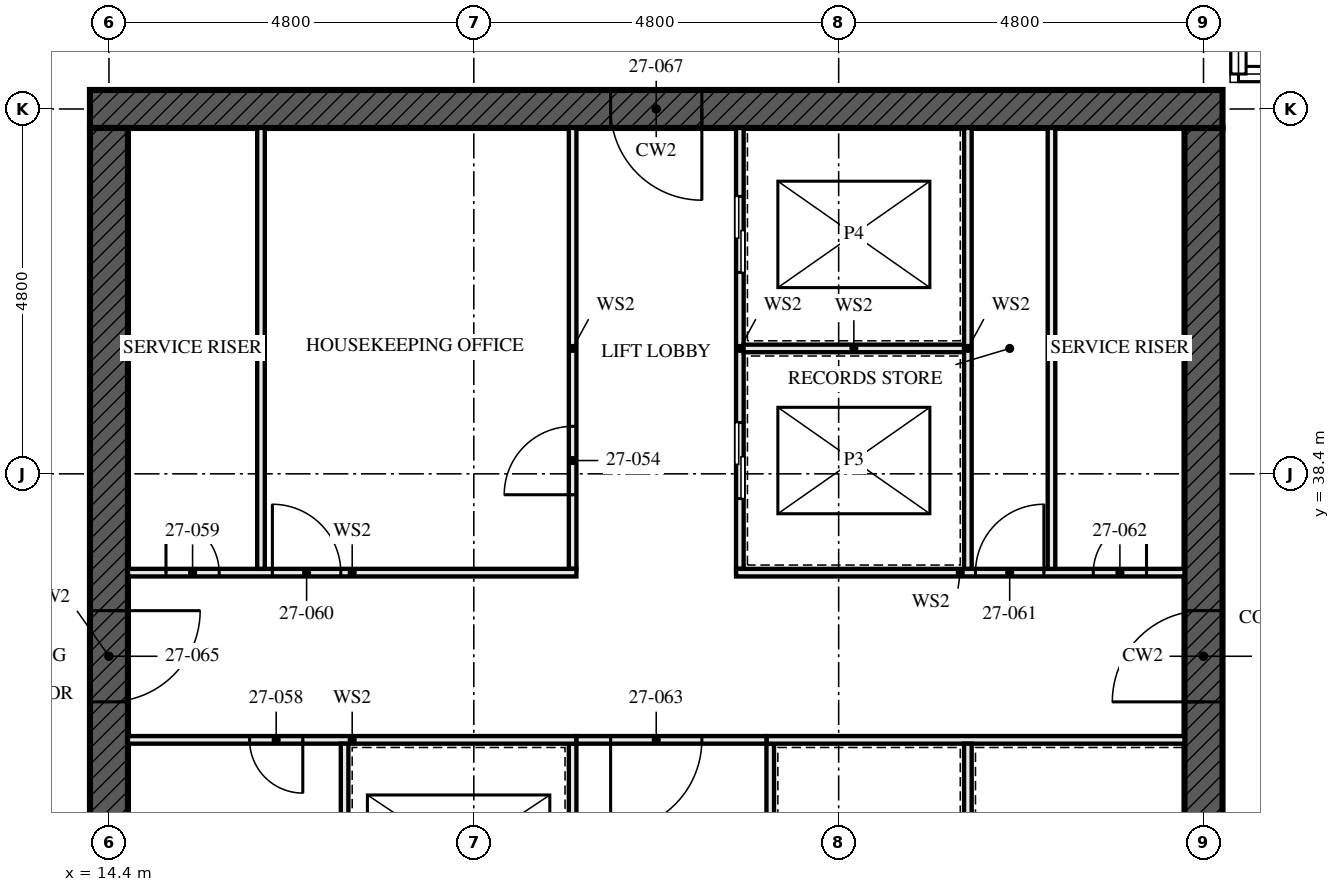
"""IFC4 building model, lengths in metres.
Left out: names, types, materials, properties, quantities, classifications, styles, units other than length and angle.
Written with IfcOpenShell. Run it as: python <this file> out.ifc"""

import sys

from ifc_helpers import new_model, si_unit, direction, frame, frame_2d, origin, place, context, subcontext, project, spatial, rectangle, extrude, element, fill, save


model = new_model("IFC4")
c1 = context("Model", 3, precision=1e-05, world=origin(), true_north=direction((0.0, 1.0)))
c2 = subcontext(c1, "Body", "Model", "MODEL_VIEW")
j1 = project(units=[si_unit("LENGTHUNIT", "METRE"), si_unit("PLANEANGLEUNIT", "RADIAN")], contexts=[c1])
p1 = place(None, origin())
s1 = spatial("IfcSite", under=j1, at=p1, CompositionType="ELEMENT")
p2 = place(p1, origin())
s2 = spatial("IfcBuilding", under=s1, at=p2, CompositionType="ELEMENT")
p3 = place(p2, frame((0.0, 0.0, 101.5)))
s3 = spatial("IfcBuildingStorey", under=s2, at=p3, CompositionType="ELEMENT", Elevation=101.5)
p4 = place(p3, frame((29.05, 43.2, -0.17), z_axis=(0.0, 0.0, 1.0), x_axis=(-1.0, 0.0, 0.0)))
e1 = element("IfcWall", 1, at=p4, inside=s3, PredefinedType="SHEAR", context=c2, shape_type="SweptSolid", body=[
    extrude(rectangle(XDim=14.9, YDim=0.5, at=frame_2d((7.45, 0.0))), origin(), (0.0, 0.0, 1.0), 3.5),
])
p5 = place(p4, frame((6.85, 0.0, 0.17)))
e2 = element("IfcOpeningElement", 2, at=p5, cuts=e1, PredefinedType="OPENING", context=c2, shape_type="SweptSolid", body=[
    extrude(rectangle(XDim=1.2, YDim=2.1, at=frame_2d((0.6, 1.05))), frame((0.0, 0.26, 0.0), z_axis=(0.0, -1.0, 0.0), x_axis=(1.0, 0.0, 0.0)), (0.0, 0.0, 1.0), 0.521),
])
p6 = place(p3, frame((14.4, 42.95, -0.17), z_axis=(0.0, 0.0, 1.0), x_axis=(0.0, -1.0, 0.0)))
e3 = element("IfcWall", 3, at=p6, inside=s3, PredefinedType="SHEAR", context=c2, shape_type="SweptSolid", body=[
    extrude(rectangle(XDim=13.9, YDim=0.5, at=frame_2d((6.95, 0.0))), origin(), (0.0, 0.0, 1.0), 3.5),
])
p7 = place(p6, frame((6.35, 0.0, 0.17)))
e4 = element("IfcOpeningElement", 4, at=p7, cuts=e3, PredefinedType="OPENING", context=c2, shape_type="SweptSolid", body=[
    extrude(rectangle(XDim=1.2, YDim=2.1, at=frame_2d((0.6, 1.05))), frame((0.0, 0.26, 0.0), z_axis=(0.0, -1.0, 0.0), x_axis=(1.0, 0.0, 0.0)), (0.0, 0.0, 1.0), 0.521),
])
p8 = place(p3, frame((28.8, 29.05, -0.17), z_axis=(0.0, 0.0, 1.0), x_axis=(0.0, 1.0, 0.0)))
e5 = element("IfcWall", 5, at=p8, inside=s3, PredefinedType="SHEAR", context=c2, shape_type="SweptSolid", body=[
    extrude(rectangle(XDim=13.9, YDim=0.5, at=frame_2d((6.95, 0.0))), origin(), (0.0, 0.0, 1.0), 3.5),
])
p9 = place(p8, frame((6.35, 0.0, 0.17)))
e6 = element("IfcOpeningElement", 6, at=p9, cuts=e5, PredefinedType="OPENING", context=c2, shape_type="SweptSolid", body=[
    extrude(rectangle(XDim=1.2, YDim=2.1, at=frame_2d((0.6, 1.05))), frame((0.0, 0.26, 0.0), z_axis=(0.0, -1.0, 0.0), x_axis=(1.0, 0.0, 0.0)), (0.0, 0.0, 1.0), 0.521),
])
for number, where, z_axis, x_axis in (
    (7, (16.4, 37.15, 0.0), (0.0, 0.0, 1.0), (0.0, 1.0, 0.0)),
    (8, (26.8, 37.15, 0.0), (0.0, 0.0, 1.0), (0.0, 1.0, 0.0)),
):
    element("IfcWall", number, at=place(p3, frame(where, z_axis=z_axis, x_axis=x_axis)), inside=s3, PredefinedType="SOLIDWALL", context=c2, shape_type="SweptSolid", body=[
        extrude(rectangle(XDim=5.8, YDim=0.1, at=frame_2d((2.9, 0.0))), origin(), (0.0, 0.0, 1.0), 3.33),
    ])
p10 = place(p3, frame((20.5, 29.05, 0.0), z_axis=(0.0, 0.0, 1.0), x_axis=(0.0, 1.0, 0.0)))
e9 = element("IfcWall", 9, at=p10, inside=s3, PredefinedType="SOLIDWALL", context=c2, shape_type="SweptSolid", body=[
    extrude(rectangle(XDim=5.8, YDim=0.1, at=frame_2d((2.9, 0.0))), origin(), (0.0, 0.0, 1.0), 3.33),
])
p11 = place(p10, frame((0.8, 0.0, 0.0)))
e10 = element("IfcOpeningElement", 10, at=p11, cuts=e9, PredefinedType="OPENING", context=c2, shape_type="SweptSolid", body=[
    extrude(rectangle(XDim=1.1, YDim=2.3, at=frame_2d((0.55, 1.15))), frame((0.0, 0.061, 0.0), z_axis=(0.0, -1.0, 0.0), x_axis=(1.0, 0.0, 0.0)), (0.0, 0.0, 1.0), 0.121),
])
p12 = place(p10, frame((3.775, 0.0, 0.0)))
e11 = element("IfcOpeningElement", 11, at=p12, cuts=e9, PredefinedType="OPENING", context=c2, shape_type="SweptSolid", body=[
    extrude(rectangle(XDim=1.1, YDim=2.3, at=frame_2d((0.55, 1.15))), frame((0.0, 0.061, 0.0), z_axis=(0.0, -1.0, 0.0), x_axis=(1.0, 0.0, 0.0)), (0.0, 0.0, 1.0), 0.121),
])
p13 = place(p3, frame((20.5, 37.15, 0.0), z_axis=(0.0, 0.0, 1.0), x_axis=(0.0, 1.0, 0.0)))
e12 = element("IfcWall", 12, at=p13, inside=s3, PredefinedType="SOLIDWALL", context=c2, shape_type="SweptSolid", body=[
    extrude(rectangle(XDim=5.8, YDim=0.1, at=frame_2d((2.9, 0.0))), origin(), (0.0, 0.0, 1.0), 3.33),
])
p14 = place(p13, frame((0.975, 0.0, 0.0)))
e13 = element("IfcOpeningElement", 13, at=p14, cuts=e12, PredefinedType="OPENING", context=c2, shape_type="SweptSolid", body=[
    extrude(rectangle(XDim=0.9, YDim=2.1, at=frame_2d((0.45, 1.05))), frame((0.0, 0.061, 0.0), z_axis=(0.0, -1.0, 0.0), x_axis=(1.0, 0.0, 0.0)), (0.0, 0.0, 1.0), 0.121),
])
p15 = place(p3, frame((22.7, 37.15, 0.0), z_axis=(0.0, 0.0, 1.0), x_axis=(0.0, 1.0, 0.0)))
e14 = element("IfcWall", 14, at=p15, inside=s3, PredefinedType="SOLIDWALL", context=c2, shape_type="SweptSolid", body=[
    extrude(rectangle(XDim=5.8, YDim=0.1, at=frame_2d((2.9, 0.0))), origin(), (0.0, 0.0, 1.0), 3.33),
])
p16 = place(p15, frame((0.925, 0.0, 0.0)))
e15 = element("IfcOpeningElement", 15, at=p16, cuts=e14, PredefinedType="OPENING", context=c2, shape_type="SweptSolid", body=[
    extrude(rectangle(XDim=1.0, YDim=2.1, at=frame_2d((0.5, 1.05))), frame((0.0, 0.061, 0.0), z_axis=(0.0, -1.0, 0.0), x_axis=(1.0, 0.0, 0.0)), (0.0, 0.0, 1.0), 0.121),
])
p17 = place(p15, frame((3.9, 0.0, 0.0)))
e16 = element("IfcOpeningElement", 16, at=p17, cuts=e14, PredefinedType="OPENING", context=c2, shape_type="SweptSolid", body=[
    extrude(rectangle(XDim=1.0, YDim=2.1, at=frame_2d((0.5, 1.05))), frame((0.0, 0.061, 0.0), z_axis=(0.0, -1.0, 0.0), x_axis=(1.0, 0.0, 0.0)), (0.0, 0.0, 1.0), 0.121),
])
p18 = place(p3, frame((23.1, 29.05, 0.0), z_axis=(0.0, 0.0, 1.0), x_axis=(0.0, 1.0, 0.0)))
e17 = element("IfcWall", 17, at=p18, inside=s3, PredefinedType="SOLIDWALL", context=c2, shape_type="SweptSolid", body=[
    extrude(rectangle(XDim=5.8, YDim=0.1, at=frame_2d((2.9, 0.0))), origin(), (0.0, 0.0, 1.0), 3.33),
])
p19 = place(p18, frame((1.0, 0.0, 0.0)))
e18 = element("IfcOpeningElement", 18, at=p19, cuts=e17, PredefinedType="OPENING", context=c2, shape_type="SweptSolid", body=[
    extrude(rectangle(XDim=0.7, YDim=2.1, at=frame_2d((0.35, 1.05))), frame((0.0, 0.061, 0.0), z_axis=(0.0, -1.0, 0.0), x_axis=(1.0, 0.0, 0.0)), (0.0, 0.0, 1.0), 0.121),
])
p20 = place(p3, frame((14.65, 34.9, 0.0), z_axis=(0.0, 0.0, 1.0), x_axis=(1.0, 0.0, 0.0)))
e19 = element("IfcWall", 19, at=p20, inside=s3, PredefinedType="SOLIDWALL", context=c2, shape_type="SweptSolid", body=[
    extrude(rectangle(XDim=5.9, YDim=0.1, at=frame_2d((2.95, 0.0))), origin(), (0.0, 0.0, 1.0), 3.33),
])
p21 = place(p20, frame((1.6, 0.0, 0.0)))
e20 = element("IfcOpeningElement", 20, at=p21, cuts=e19, PredefinedType="OPENING", context=c2, shape_type="SweptSolid", body=[
    extrude(rectangle(XDim=0.7, YDim=2.1, at=frame_2d((0.35, 1.05))), frame((0.0, 0.061, 0.0), z_axis=(0.0, -1.0, 0.0), x_axis=(1.0, 0.0, 0.0)), (0.0, 0.0, 1.0), 0.121),
])
p22 = place(p3, frame((23.05, 34.9, 0.0), z_axis=(0.0, 0.0, 1.0), x_axis=(1.0, 0.0, 0.0)))
e21 = element("IfcWall", 21, at=p22, inside=s3, PredefinedType="SOLIDWALL", context=c2, shape_type="SweptSolid", body=[
    extrude(rectangle(XDim=5.5, YDim=0.1, at=frame_2d((2.75, 0.0))), origin(), (0.0, 0.0, 1.0), 3.33),
])
p23 = place(p3, frame((14.65, 37.1, 0.0), z_axis=(0.0, 0.0, 1.0), x_axis=(1.0, 0.0, 0.0)))
e22 = element("IfcWall", 22, at=p23, inside=s3, PredefinedType="SOLIDWALL", context=c2, shape_type="SweptSolid", body=[
    extrude(rectangle(XDim=5.9, YDim=0.1, at=frame_2d((2.95, 0.0))), origin(), (0.0, 0.0, 1.0), 3.33),
])
p24 = place(p23, frame((0.5, 0.0, 0.0)))
e23 = element("IfcOpeningElement", 23, at=p24, cuts=e22, PredefinedType="OPENING", context=c2, shape_type="SweptSolid", body=[
    extrude(rectangle(XDim=0.7, YDim=2.1, at=frame_2d((0.35, 1.05))), frame((0.0, 0.061, 0.0), z_axis=(0.0, -1.0, 0.0), x_axis=(1.0, 0.0, 0.0)), (0.0, 0.0, 1.0), 0.121),
])
p25 = place(p23, frame((1.9, 0.0, 0.0)))
e24 = element("IfcOpeningElement", 24, at=p25, cuts=e22, PredefinedType="OPENING", context=c2, shape_type="SweptSolid", body=[
    extrude(rectangle(XDim=0.9, YDim=2.1, at=frame_2d((0.45, 1.05))), frame((0.0, 0.061, 0.0), z_axis=(0.0, -1.0, 0.0), x_axis=(1.0, 0.0, 0.0)), (0.0, 0.0, 1.0), 0.121),
])
p26 = place(p3, frame((22.65, 37.1, 0.0), z_axis=(0.0, 0.0, 1.0), x_axis=(1.0, 0.0, 0.0)))
e25 = element("IfcWall", 25, at=p26, inside=s3, PredefinedType="SOLIDWALL", context=c2, shape_type="SweptSolid", body=[
    extrude(rectangle(XDim=5.9, YDim=0.1, at=frame_2d((2.95, 0.0))), origin(), (0.0, 0.0, 1.0), 3.33),
])
p27 = place(p26, frame((3.15, 0.0, 0.0)))
e26 = element("IfcOpeningElement", 26, at=p27, cuts=e25, PredefinedType="OPENING", context=c2, shape_type="SweptSolid", body=[
    extrude(rectangle(XDim=0.9, YDim=2.1, at=frame_2d((0.45, 1.05))), frame((0.0, 0.061, 0.0), z_axis=(0.0, -1.0, 0.0), x_axis=(1.0, 0.0, 0.0)), (0.0, 0.0, 1.0), 0.121),
])
p28 = place(p26, frame((4.7, 0.0, 0.0)))
e27 = element("IfcOpeningElement", 27, at=p28, cuts=e25, PredefinedType="OPENING", context=c2, shape_type="SweptSolid", body=[
    extrude(rectangle(XDim=0.7, YDim=2.1, at=frame_2d((0.35, 1.05))), frame((0.0, 0.061, 0.0), z_axis=(0.0, -1.0, 0.0), x_axis=(1.0, 0.0, 0.0)), (0.0, 0.0, 1.0), 0.121),
])
p29 = place(p3, frame((20.55, 34.9, 0.0), z_axis=(0.0, 0.0, 1.0), x_axis=(1.0, 0.0, 0.0)))
e28 = element("IfcWall", 28, at=p29, inside=s3, PredefinedType="SOLIDWALL", context=c2, shape_type="SweptSolid", body=[
    extrude(rectangle(XDim=2.5, YDim=0.1, at=frame_2d((1.25, 0.0))), origin(), (0.0, 0.0, 1.0), 3.33),
])
p30 = place(p29, frame((0.45, 0.0, 0.0)))
e29 = element("IfcOpeningElement", 29, at=p30, cuts=e28, PredefinedType="OPENING", context=c2, shape_type="SweptSolid", body=[
    extrude(rectangle(XDim=1.2, YDim=2.1, at=frame_2d((0.6, 1.05))), frame((0.0, 0.061, 0.0), z_axis=(0.0, -1.0, 0.0), x_axis=(1.0, 0.0, 0.0)), (0.0, 0.0, 1.0), 0.121),
])
p31 = place(p3, frame((17.5, 29.05, 0.0), z_axis=(0.0, 0.0, 1.0), x_axis=(0.0, 1.0, 0.0)))
e30 = element("IfcWall", 30, at=p31, inside=s3, PredefinedType="SOLIDWALL", context=c2, shape_type="SweptSolid", body=[
    extrude(rectangle(XDim=5.8, YDim=0.1, at=frame_2d((2.9, 0.0))), origin(), (0.0, 0.0, 1.0), 3.33),
])
p32 = place(p3, frame((22.75, 40.05, 0.0), z_axis=(0.0, 0.0, 1.0), x_axis=(1.0, 0.0, 0.0)))
e31 = element("IfcWall", 31, at=p32, inside=s3, PredefinedType="SOLIDWALL", context=c2, shape_type="SweptSolid", body=[
    extrude(rectangle(XDim=2.9, YDim=0.1, at=frame_2d((1.45, 0.0))), origin(), (0.0, 0.0, 1.0), 3.33),
])
p33 = place(p3, frame((25.7, 37.15, 0.0), z_axis=(0.0, 0.0, 1.0), x_axis=(0.0, 1.0, 0.0)))
e32 = element("IfcWall", 32, at=p33, inside=s3, PredefinedType="SOLIDWALL", context=c2, shape_type="SweptSolid", body=[
    extrude(rectangle(XDim=5.8, YDim=0.1, at=frame_2d((2.9, 0.0))), origin(), (0.0, 0.0, 1.0), 3.33),
])
p34 = place(p3, frame((25.7, 31.95, 0.0), z_axis=(0.0, 0.0, 1.0), x_axis=(0.0, 1.0, 0.0)))
e33 = element("IfcWall", 33, at=p34, inside=s3, PredefinedType="SOLIDWALL", context=c2, shape_type="SweptSolid", body=[
    extrude(rectangle(XDim=2.9, YDim=0.1, at=frame_2d((1.45, 0.0))), origin(), (0.0, 0.0, 1.0), 3.33),
])
p35 = place(p14, origin())
e34 = element("IfcDoor", 34, at=p35, inside=s3, OperationType="SINGLE_SWING_RIGHT", PredefinedType="DOOR", context=c2, shape_type="SweptSolid", body=[
    extrude(rectangle(XDim=0.9, YDim=2.1, at=frame_2d((0.45, 1.05))), frame((0.0, 0.027, 0.0), z_axis=(0.0, -1.0, 0.0), x_axis=(1.0, 0.0, 0.0)), (0.0, 0.0, 1.0), 0.054),
])
fill(e13, e34)
p36 = place(p16, origin())
e35 = element("IfcDoor", 35, at=p36, inside=s3, OperationType="SLIDING_TO_LEFT", PredefinedType="DOOR", context=c2, shape_type="SweptSolid", body=[
    extrude(rectangle(XDim=1.0, YDim=2.1, at=frame_2d((0.5, 1.05))), frame((0.0, 0.05, 0.0), z_axis=(0.0, -1.0, 0.0), x_axis=(1.0, 0.0, 0.0)), (0.0, 0.0, 1.0), 0.1),
])
fill(e15, e35)
p37 = place(p17, origin())
e36 = element("IfcDoor", 36, at=p37, inside=s3, OperationType="SLIDING_TO_LEFT", PredefinedType="DOOR", context=c2, shape_type="SweptSolid", body=[
    extrude(rectangle(XDim=1.0, YDim=2.1, at=frame_2d((0.5, 1.05))), frame((0.0, 0.05, 0.0), z_axis=(0.0, -1.0, 0.0), x_axis=(1.0, 0.0, 0.0)), (0.0, 0.0, 1.0), 0.1),
])
fill(e16, e36)
p38 = place(p21, frame((0.7, 0.0, 0.0), z_axis=(0.0, 0.0, 1.0), x_axis=(-1.0, 0.0, 0.0)))
e37 = element("IfcDoor", 37, at=p38, inside=s3, OperationType="SINGLE_SWING_RIGHT", PredefinedType="DOOR", context=c2, shape_type="SweptSolid", body=[
    extrude(rectangle(XDim=0.7, YDim=2.1, at=frame_2d((0.35, 1.05))), frame((0.0, 0.027, 0.0), z_axis=(0.0, -1.0, 0.0), x_axis=(1.0, 0.0, 0.0)), (0.0, 0.0, 1.0), 0.054),
])
fill(e20, e37)
p39 = place(p24, origin())
e38 = element("IfcDoor", 38, at=p39, inside=s3, OperationType="SINGLE_SWING_RIGHT", PredefinedType="DOOR", context=c2, shape_type="SweptSolid", body=[
    extrude(rectangle(XDim=0.7, YDim=2.1, at=frame_2d((0.35, 1.05))), frame((0.0, 0.027, 0.0), z_axis=(0.0, -1.0, 0.0), x_axis=(1.0, 0.0, 0.0)), (0.0, 0.0, 1.0), 0.054),
])
fill(e23, e38)
p40 = place(p25, origin())
e39 = element("IfcDoor", 39, at=p40, inside=s3, OperationType="SINGLE_SWING_RIGHT", PredefinedType="DOOR", context=c2, shape_type="SweptSolid", body=[
    extrude(rectangle(XDim=0.9, YDim=2.1, at=frame_2d((0.45, 1.05))), frame((0.0, 0.027, 0.0), z_axis=(0.0, -1.0, 0.0), x_axis=(1.0, 0.0, 0.0)), (0.0, 0.0, 1.0), 0.054),
])
fill(e24, e39)
p41 = place(p27, origin())
e40 = element("IfcDoor", 40, at=p41, inside=s3, OperationType="SINGLE_SWING_LEFT", PredefinedType="DOOR", context=c2, shape_type="SweptSolid", body=[
    extrude(rectangle(XDim=0.9, YDim=2.1, at=frame_2d((0.45, 1.05))), frame((0.0, 0.027, 0.0), z_axis=(0.0, -1.0, 0.0), x_axis=(1.0, 0.0, 0.0)), (0.0, 0.0, 1.0), 0.054),
])
fill(e26, e40)
p42 = place(p28, origin())
e41 = element("IfcDoor", 41, at=p42, inside=s3, OperationType="SINGLE_SWING_LEFT", PredefinedType="DOOR", context=c2, shape_type="SweptSolid", body=[
    extrude(rectangle(XDim=0.7, YDim=2.1, at=frame_2d((0.35, 1.05))), frame((0.0, 0.027, 0.0), z_axis=(0.0, -1.0, 0.0), x_axis=(1.0, 0.0, 0.0)), (0.0, 0.0, 1.0), 0.054),
])
fill(e27, e41)
p43 = place(p30, frame((1.2, 0.0, 0.0), z_axis=(0.0, 0.0, 1.0), x_axis=(-1.0, 0.0, 0.0)))
e42 = element("IfcDoor", 42, at=p43, inside=s3, OperationType="SINGLE_SWING_LEFT", PredefinedType="DOOR", context=c2, shape_type="SweptSolid", body=[
    extrude(rectangle(XDim=1.2, YDim=2.1, at=frame_2d((0.6, 1.05))), frame((0.0, 0.027, 0.0), z_axis=(0.0, -1.0, 0.0), x_axis=(1.0, 0.0, 0.0)), (0.0, 0.0, 1.0), 0.054),
])
fill(e29, e42)
p44 = place(p7, origin())
e43 = element("IfcDoor", 43, at=p44, inside=s3, OperationType="SINGLE_SWING_LEFT", PredefinedType="DOOR", context=c2, shape_type="SweptSolid", body=[
    extrude(rectangle(XDim=1.2, YDim=2.1, at=frame_2d((0.6, 1.05))), frame((0.0, 0.027, 0.0), z_axis=(0.0, -1.0, 0.0), x_axis=(1.0, 0.0, 0.0)), (0.0, 0.0, 1.0), 0.054),
])
fill(e4, e43)
p45 = place(p9, origin())
e44 = element("IfcDoor", 44, at=p45, inside=s3, OperationType="SINGLE_SWING_LEFT", PredefinedType="DOOR", context=c2, shape_type="SweptSolid", body=[
    extrude(rectangle(XDim=1.2, YDim=2.1, at=frame_2d((0.6, 1.05))), frame((0.0, 0.027, 0.0), z_axis=(0.0, -1.0, 0.0), x_axis=(1.0, 0.0, 0.0)), (0.0, 0.0, 1.0), 0.054),
])
fill(e6, e44)
p46 = place(p5, origin())
e45 = element("IfcDoor", 45, at=p46, inside=s3, OperationType="SINGLE_SWING_LEFT", PredefinedType="DOOR", context=c2, shape_type="SweptSolid", body=[
    extrude(rectangle(XDim=1.2, YDim=2.1, at=frame_2d((0.6, 1.05))), frame((0.0, 0.027, 0.0), z_axis=(0.0, -1.0, 0.0), x_axis=(1.0, 0.0, 0.0)), (0.0, 0.0, 1.0), 0.054),
])
fill(e2, e45)
save(model, sys.argv[1])
